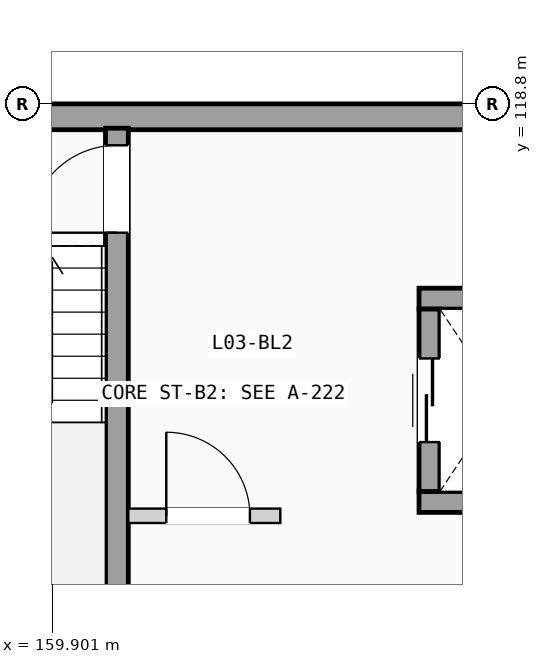
"""IFC4 building model, lengths in metres.
Left out: names, types, materials, properties, quantities, classifications, styles, units other than length and angle.
Written with IfcOpenShell. Run it as: python <this file> out.ifc"""

import sys

from ifc_helpers import new_model, si_unit, direction, frame, frame_2d, origin, place, context, subcontext, project, spatial, rectangle, extrude, element, fill, save


model = new_model("IFC4")
c1 = context("Model", 3, precision=1e-05, world=origin(), true_north=direction((0.0, 1.0)))
c2 = subcontext(c1, "Body", "Model", "MODEL_VIEW")
j1 = project(units=[si_unit("LENGTHUNIT", "METRE"), si_unit("PLANEANGLEUNIT", "RADIAN")], contexts=[c1])
p1 = place(None, origin())
s1 = spatial("IfcSite", under=j1, at=p1, CompositionType="ELEMENT")
p2 = place(p1, origin())
s2 = spatial("IfcBuilding", under=s1, at=p2, CompositionType="ELEMENT")
p3 = place(p2, frame((0.0, 0.0, 12.075)))
s3 = spatial("IfcBuildingStorey", under=s2, at=p3, CompositionType="ELEMENT", Elevation=12.075)
p4 = place(p3, frame((151.2, 118.63, 0.0), z_axis=(0.0, 0.0, 1.0), x_axis=(1.0, 0.0, 0.0)))
e1 = element("IfcWall", 1, at=p4, inside=s3, PredefinedType="SOLIDWALL", context=c2, shape_type="SweptSolid", body=[
    extrude(rectangle(XDim=21.6, YDim=0.34, at=frame_2d((10.8, 0.0))), origin(), (0.0, 0.0, 1.0), 2.89),
])
p5 = place(p3, frame((160.75, 111.48, 0.0), z_axis=(0.0, 0.0, 1.0), x_axis=(0.0, 1.0, 0.0)))
e2 = element("IfcWall", 2, at=p5, inside=s3, PredefinedType="SHEAR", context=c2, shape_type="SweptSolid", body=[
    extrude(rectangle(XDim=7.0, YDim=0.3, at=frame_2d((3.5, 0.0))), origin(), (0.0, 0.0, 1.0), 2.89),
])
p6 = place(p5, frame((5.625, 0.0, 0.0)))
e3 = element("IfcOpeningElement", 3, at=p6, cuts=e2, PredefinedType="OPENING", context=c2, shape_type="SweptSolid", body=[
    extrude(rectangle(XDim=1.15, YDim=2.12, at=frame_2d((0.575, 1.06))), frame((0.0, 0.16, 0.0), z_axis=(0.0, -1.0, 0.0), x_axis=(1.0, 0.0, 0.0)), (0.0, 0.0, 1.0), 0.32),
])
for number, where, z_axis, x_axis in (
    (4, (164.725, 113.562, 0.0), (0.0, 0.0, 1.0), (1.0, 0.0, 0.0)),
    (5, (164.725, 116.238, 0.0), (0.0, 0.0, 1.0), (1.0, 0.0, 0.0)),
):
    element("IfcWall", number, at=place(p3, frame(where, z_axis=z_axis, x_axis=x_axis)), inside=s3, PredefinedType="SHEAR", context=c2, shape_type="SweptSolid", body=[
        extrude(rectangle(XDim=2.15, YDim=0.275, at=frame_2d((1.075, 0.0))), origin(), (0.0, 0.0, 1.0), 2.89),
    ])
p7 = place(p3, frame((164.863, 113.7, 0.0), z_axis=(0.0, 0.0, 1.0), x_axis=(0.0, 1.0, 0.0)))
e6 = element("IfcWall", 6, at=p7, inside=s3, PredefinedType="SHEAR", context=c2, shape_type="SweptSolid", body=[
    extrude(rectangle(XDim=2.4, YDim=0.275, at=frame_2d((1.2, 0.0))), origin(), (0.0, 0.0, 1.0), 2.89),
])
p8 = place(p7, frame((0.65, 0.0, 0.0)))
e7 = element("IfcOpeningElement", 7, at=p8, cuts=e6, PredefinedType="OPENING", context=c2, shape_type="SweptSolid", body=[
    extrude(rectangle(XDim=1.1, YDim=2.15, at=frame_2d((0.55, 1.075))), frame((0.0, 0.147, 0.0), z_axis=(0.0, -1.0, 0.0), x_axis=(1.0, 0.0, 0.0)), (0.0, 0.0, 1.0), 0.295),
])
p9 = place(p3, frame((160.9, 113.38, 0.0), z_axis=(0.0, 0.0, 1.0), x_axis=(1.0, 0.0, 0.0)))
e8 = element("IfcWall", 8, at=p9, inside=s3, PredefinedType="PARTITIONING", context=c2, shape_type="SweptSolid", body=[
    extrude(rectangle(XDim=2.0, YDim=0.19, at=frame_2d((1.0, 0.0))), origin(), (0.0, 0.0, 1.0), 2.87),
])
p10 = place(p9, frame((0.5, 0.0, 0.0)))
e9 = element("IfcOpeningElement", 9, at=p10, cuts=e8, PredefinedType="OPENING", context=c2, shape_type="SweptSolid", body=[
    extrude(rectangle(XDim=1.1, YDim=2.12, at=frame_2d((0.55, 1.06))), frame((0.0, 0.105, 0.0), z_axis=(0.0, -1.0, 0.0), x_axis=(1.0, 0.0, 0.0)), (0.0, 0.0, 1.0), 0.21),
])
p11 = place(p6, origin())
e10 = element("IfcDoor", 10, at=p11, inside=s3, OperationType="SINGLE_SWING_LEFT", PredefinedType="DOOR", context=c2, shape_type="SweptSolid", body=[
    extrude(rectangle(XDim=1.15, YDim=2.12, at=frame_2d((0.575, 1.06))), frame((0.0, 0.025, 0.0), z_axis=(0.0, -1.0, 0.0), x_axis=(1.0, 0.0, 0.0)), (0.0, 0.0, 1.0), 0.05),
])
fill(e3, e10)
p12 = place(p8, origin())
e11 = element("IfcDoor", 11, at=p12, inside=s3, OperationType="SLIDING_TO_LEFT", PredefinedType="DOOR", context=c2, shape_type="SweptSolid", body=[
    extrude(rectangle(XDim=1.1, YDim=2.15, at=frame_2d((0.55, 1.075))), frame((0.0, 0.025, 0.0), z_axis=(0.0, -1.0, 0.0), x_axis=(1.0, 0.0, 0.0)), (0.0, 0.0, 1.0), 0.05),
])
fill(e7, e11)
p13 = place(p10, origin())
e12 = element("IfcDoor", 12, at=p13, inside=s3, OperationType="SINGLE_SWING_LEFT", PredefinedType="DOOR", context=c2, shape_type="SweptSolid", body=[
    extrude(rectangle(XDim=1.1, YDim=2.12, at=frame_2d((0.55, 1.06))), frame((0.0, 0.025, 0.0), z_axis=(0.0, -1.0, 0.0), x_axis=(1.0, 0.0, 0.0)), (0.0, 0.0, 1.0), 0.05),
])
fill(e9, e12)
save(model, sys.argv[1])
